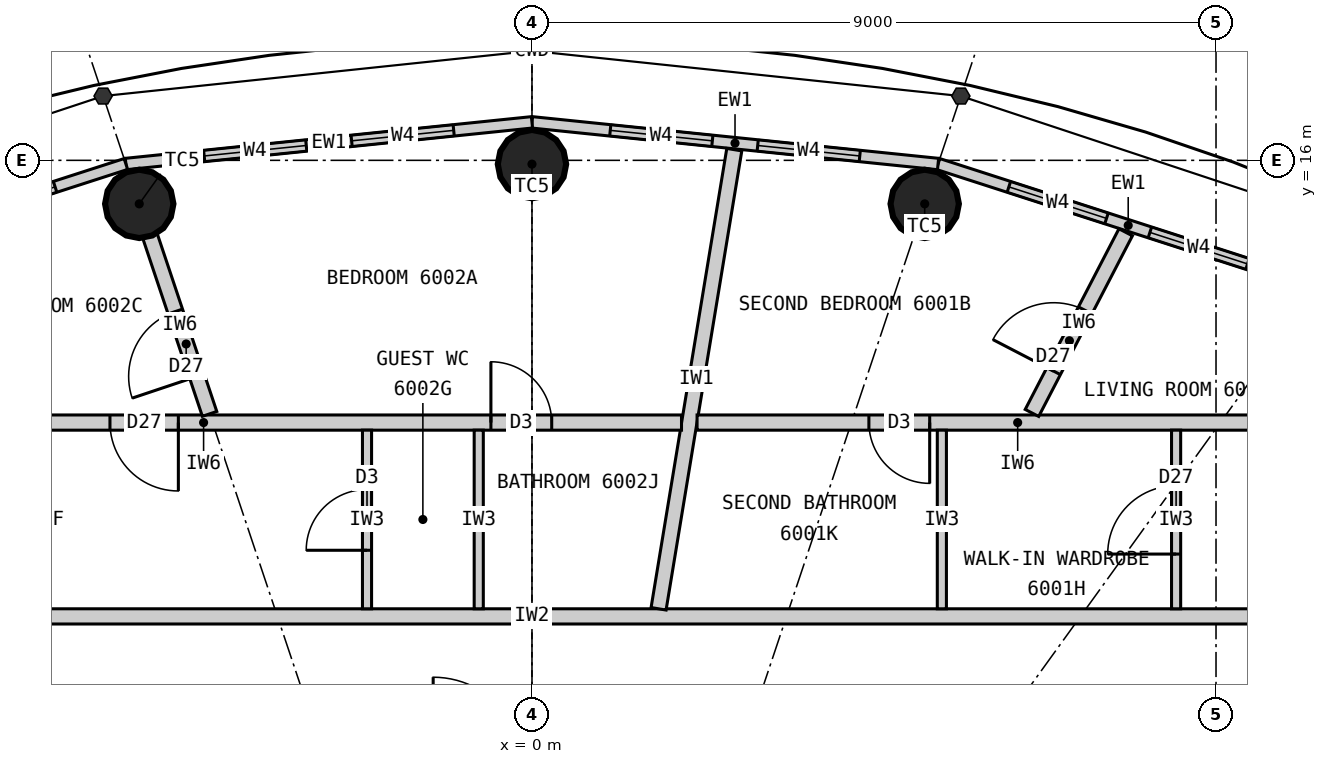
"""IFC4 building model, lengths in metres.
Left out: names, types, materials, properties, quantities, classifications, styles, units other than length and angle.
Written with IfcOpenShell. Run it as: python <this file> out.ifc"""

import sys

from ifc_helpers import new_model, si_unit, direction, frame, frame_2d, origin, origin_2d, place, context, subcontext, project, spatial, rectangle, circle, extrude, element, fill, save


model = new_model("IFC4")
c1 = context("Model", 3, precision=1e-05, world=origin(), true_north=direction((0.0, 1.0)))
c2 = subcontext(c1, "Body", "Model", "MODEL_VIEW")
j1 = project(units=[si_unit("LENGTHUNIT", "METRE"), si_unit("PLANEANGLEUNIT", "RADIAN")], contexts=[c1])
p1 = place(None, origin())
s1 = spatial("IfcSite", under=j1, at=p1, CompositionType="ELEMENT")
p2 = place(p1, origin())
s2 = spatial("IfcBuilding", under=s1, at=p2, CompositionType="ELEMENT")
p3 = place(p2, frame((0.0, 0.0, 222.6)))
s3 = spatial("IfcBuildingStorey", under=s2, at=p3, CompositionType="ELEMENT", Elevation=222.6)
for number, where, z_axis, x_axis in (
    (1, (5.167, 15.427, 0.0), (0.0, 0.0, 1.0), (1.0, 0.0, 0.0)),
    (2, (0.0, 15.95, 0.0), (0.0, 0.0, 1.0), (1.0, 0.0, 0.0)),
    (3, (-5.167, 15.427, 0.0), (0.0, 0.0, 1.0), (1.0, 0.0, 0.0)),
):
    element("IfcColumn", number, at=place(p3, frame(where, z_axis=z_axis, x_axis=x_axis)), inside=s3, PredefinedType="COLUMN", context=c2, shape_type="SweptSolid", body=[
        extrude(circle(Radius=0.45, at=origin_2d()), origin(), (0.0, 0.0, 1.0), 3.3),
    ])
p4 = place(p3, frame((10.346, 14.336, 0.0), z_axis=(0.0, 0.0, 1.0), x_axis=(-0.951644702515, 0.307200846638, 0.0)))
e4 = element("IfcWall", 4, at=p4, inside=s3, PredefinedType="ELEMENTEDWALL", context=c2, shape_type="SweptSolid", body=[
    extrude(rectangle(XDim=5.258, YDim=0.15, at=frame_2d((2.629, 0.0))), origin(), (0.0, 0.0, 1.0), 3.12),
])
p5 = place(p4, frame((0.979, 0.0, 0.9)))
e5 = element("IfcOpeningElement", 5, at=p5, cuts=e4, PredefinedType="OPENING", context=c2, shape_type="SweptSolid", body=[
    extrude(rectangle(XDim=1.35, YDim=1.9, at=frame_2d((0.675, 0.95))), frame((0.0, 0.085, 0.0), z_axis=(0.0, -1.0, 0.0), x_axis=(1.0, 0.0, 0.0)), (0.0, 0.0, 1.0), 0.17),
])
p6 = place(p4, frame((2.929, 0.0, 0.9)))
e6 = element("IfcOpeningElement", 6, at=p6, cuts=e4, PredefinedType="OPENING", context=c2, shape_type="SweptSolid", body=[
    extrude(rectangle(XDim=1.35, YDim=1.9, at=frame_2d((0.675, 0.95))), frame((0.0, 0.085, 0.0), z_axis=(0.0, -1.0, 0.0), x_axis=(1.0, 0.0, 0.0)), (0.0, 0.0, 1.0), 0.17),
])
p7 = place(p3, frame((5.343, 15.952, 0.0), z_axis=(0.0, 0.0, 1.0), x_axis=(-0.994774574972, 0.102095763818, 0.0)))
e7 = element("IfcWall", 7, at=p7, inside=s3, PredefinedType="ELEMENTEDWALL", context=c2, shape_type="SweptSolid", body=[
    extrude(rectangle(XDim=5.371, YDim=0.15, at=frame_2d((2.686, 0.0))), origin(), (0.0, 0.0, 1.0), 3.12),
])
p8 = place(p7, frame((1.035, 0.0, 0.9)))
e8 = element("IfcOpeningElement", 8, at=p8, cuts=e7, PredefinedType="OPENING", context=c2, shape_type="SweptSolid", body=[
    extrude(rectangle(XDim=1.35, YDim=1.9, at=frame_2d((0.675, 0.95))), frame((0.0, 0.085, 0.0), z_axis=(0.0, -1.0, 0.0), x_axis=(1.0, 0.0, 0.0)), (0.0, 0.0, 1.0), 0.17),
])
p9 = place(p7, frame((2.985, 0.0, 0.9)))
e9 = element("IfcOpeningElement", 9, at=p9, cuts=e7, PredefinedType="OPENING", context=c2, shape_type="SweptSolid", body=[
    extrude(rectangle(XDim=1.35, YDim=1.9, at=frame_2d((0.675, 0.95))), frame((0.0, 0.085, 0.0), z_axis=(0.0, -1.0, 0.0), x_axis=(1.0, 0.0, 0.0)), (0.0, 0.0, 1.0), 0.17),
])
p10 = place(p3, frame((0.0, 16.5, 0.0), z_axis=(0.0, 0.0, 1.0), x_axis=(-0.994774574972, -0.102095763818, 0.0)))
e10 = element("IfcWall", 10, at=p10, inside=s3, PredefinedType="ELEMENTEDWALL", context=c2, shape_type="SweptSolid", body=[
    extrude(rectangle(XDim=5.371, YDim=0.15, at=frame_2d((2.686, 0.0))), origin(), (0.0, 0.0, 1.0), 3.12),
])
p11 = place(p10, frame((1.035, 0.0, 0.9)))
e11 = element("IfcOpeningElement", 11, at=p11, cuts=e10, PredefinedType="OPENING", context=c2, shape_type="SweptSolid", body=[
    extrude(rectangle(XDim=1.35, YDim=1.9, at=frame_2d((0.675, 0.95))), frame((0.0, 0.085, 0.0), z_axis=(0.0, -1.0, 0.0), x_axis=(1.0, 0.0, 0.0)), (0.0, 0.0, 1.0), 0.17),
])
p12 = place(p10, frame((2.985, 0.0, 0.9)))
e12 = element("IfcOpeningElement", 12, at=p12, cuts=e10, PredefinedType="OPENING", context=c2, shape_type="SweptSolid", body=[
    extrude(rectangle(XDim=1.35, YDim=1.9, at=frame_2d((0.675, 0.95))), frame((0.0, 0.085, 0.0), z_axis=(0.0, -1.0, 0.0), x_axis=(1.0, 0.0, 0.0)), (0.0, 0.0, 1.0), 0.17),
])
p13 = place(p3, frame((-5.343, 15.952, 0.0), z_axis=(0.0, 0.0, 1.0), x_axis=(-0.951644702515, -0.307200846638, 0.0)))
e13 = element("IfcWall", 13, at=p13, inside=s3, PredefinedType="ELEMENTEDWALL", context=c2, shape_type="SweptSolid", body=[
    extrude(rectangle(XDim=5.258, YDim=0.15, at=frame_2d((2.629, 0.0))), origin(), (0.0, 0.0, 1.0), 3.12),
])
p14 = place(p13, frame((0.979, 0.0, 0.9)))
e14 = element("IfcOpeningElement", 14, at=p14, cuts=e13, PredefinedType="OPENING", context=c2, shape_type="SweptSolid", body=[
    extrude(rectangle(XDim=1.35, YDim=1.9, at=frame_2d((0.675, 0.95))), frame((0.0, 0.085, 0.0), z_axis=(0.0, -1.0, 0.0), x_axis=(1.0, 0.0, 0.0)), (0.0, 0.0, 1.0), 0.17),
])
p15 = place(p13, frame((2.929, 0.0, 0.9)))
e15 = element("IfcOpeningElement", 15, at=p15, cuts=e13, PredefinedType="OPENING", context=c2, shape_type="SweptSolid", body=[
    extrude(rectangle(XDim=1.35, YDim=1.9, at=frame_2d((0.675, 0.95))), frame((0.0, 0.085, 0.0), z_axis=(0.0, -1.0, 0.0), x_axis=(1.0, 0.0, 0.0)), (0.0, 0.0, 1.0), 0.17),
])
p16 = place(p3, frame((-11.1, 10.0, 0.0), z_axis=(0.0, 0.0, 1.0), x_axis=(1.0, 0.0, 0.0)))
e16 = element("IfcWall", 16, at=p16, inside=s3, PredefinedType="PARTITIONING", context=c2, shape_type="SweptSolid", body=[
    extrude(rectangle(XDim=22.2, YDim=0.2, at=frame_2d((11.1, 0.0))), origin(), (0.0, 0.0, 1.0), 3.12),
])
p17 = place(p16, frame((20.9, 0.0, 0.0)))
e17 = element("IfcOpeningElement", 17, at=p17, cuts=e16, PredefinedType="OPENING", context=c2, shape_type="SweptSolid", body=[
    extrude(rectangle(XDim=1.0, YDim=2.2, at=frame_2d((0.5, 1.1))), frame((0.0, 0.11, 0.0), z_axis=(0.0, -1.0, 0.0), x_axis=(1.0, 0.0, 0.0)), (0.0, 0.0, 1.0), 0.22),
])
p18 = place(p16, frame((2.82, 0.0, 0.0)))
e18 = element("IfcOpeningElement", 18, at=p18, cuts=e16, PredefinedType="OPENING", context=c2, shape_type="SweptSolid", body=[
    extrude(rectangle(XDim=1.0, YDim=2.2, at=frame_2d((0.5, 1.1))), frame((0.0, 0.11, 0.0), z_axis=(0.0, -1.0, 0.0), x_axis=(1.0, 0.0, 0.0)), (0.0, 0.0, 1.0), 0.22),
])
p19 = place(p3, frame((1.666, 10.1, 0.0), z_axis=(0.0, 0.0, 1.0), x_axis=(0.162710847913, 0.986673796131, 0.0)))
e19 = element("IfcWall", 19, at=p19, inside=s3, PredefinedType="PARTITIONING", context=c2, shape_type="SweptSolid", body=[
    extrude(rectangle(XDim=6.122, YDim=0.2, at=frame_2d((3.061, 0.0))), origin(), (0.0, 0.0, 1.0), 3.12),
])
p20 = place(p3, frame((10.609, 12.55, 0.0), z_axis=(0.0, 0.0, 1.0), x_axis=(-1.0, 0.0, 0.0)))
e20 = element("IfcWall", 20, at=p20, inside=s3, PredefinedType="PARTITIONING", context=c2, shape_type="SweptSolid", body=[
    extrude(rectangle(XDim=8.437, YDim=0.2, at=frame_2d((4.218, 0.0))), origin(), (0.0, 0.0, 1.0), 3.12),
])
p21 = place(p20, frame((5.376, 0.0, 0.0)))
e21 = element("IfcOpeningElement", 21, at=p21, cuts=e20, PredefinedType="OPENING", context=c2, shape_type="SweptSolid", body=[
    extrude(rectangle(XDim=0.8, YDim=2.1, at=frame_2d((0.4, 1.05))), frame((0.0, 0.11, 0.0), z_axis=(0.0, -1.0, 0.0), x_axis=(1.0, 0.0, 0.0)), (0.0, 0.0, 1.0), 0.22),
])
p22 = place(p3, frame((6.578, 12.677, 0.0), z_axis=(0.0, 0.0, 1.0), x_axis=(0.460620531465, 0.887597164255, 0.0)))
e22 = element("IfcWall", 22, at=p22, inside=s3, PredefinedType="PARTITIONING", context=c2, shape_type="SweptSolid", body=[
    extrude(rectangle(XDim=2.678, YDim=0.2, at=frame_2d((1.339, 0.0))), origin(), (0.0, 0.0, 1.0), 3.12),
])
p23 = place(p22, frame((0.62, 0.0, 0.0)))
e23 = element("IfcOpeningElement", 23, at=p23, cuts=e22, PredefinedType="OPENING", context=c2, shape_type="SweptSolid", body=[
    extrude(rectangle(XDim=0.9, YDim=2.1, at=frame_2d((0.45, 1.05))), frame((0.0, 0.11, 0.0), z_axis=(0.0, -1.0, 0.0), x_axis=(1.0, 0.0, 0.0)), (0.0, 0.0, 1.0), 0.22),
])
p24 = place(p3, frame((8.475, 10.1, 0.0), z_axis=(0.0, 0.0, 1.0), x_axis=(0.0, 1.0, 0.0)))
e24 = element("IfcWall", 24, at=p24, inside=s3, PredefinedType="PARTITIONING", context=c2, shape_type="SweptSolid", body=[
    extrude(rectangle(XDim=2.35, YDim=0.12, at=frame_2d((1.175, 0.0))), origin(), (0.0, 0.0, 1.0), 3.12),
])
p25 = place(p24, frame((0.72, 0.0, 0.0)))
e25 = element("IfcOpeningElement", 25, at=p25, cuts=e24, PredefinedType="OPENING", context=c2, shape_type="SweptSolid", body=[
    extrude(rectangle(XDim=0.9, YDim=2.1, at=frame_2d((0.45, 1.05))), frame((0.0, 0.07, 0.0), z_axis=(0.0, -1.0, 0.0), x_axis=(1.0, 0.0, 0.0)), (0.0, 0.0, 1.0), 0.14),
])
p26 = place(p3, frame((5.393, 10.1, 0.0), z_axis=(0.0, 0.0, 1.0), x_axis=(0.0, 1.0, 0.0)))
e26 = element("IfcWall", 26, at=p26, inside=s3, PredefinedType="PARTITIONING", context=c2, shape_type="SweptSolid", body=[
    extrude(rectangle(XDim=2.35, YDim=0.12, at=frame_2d((1.175, 0.0))), origin(), (0.0, 0.0, 1.0), 3.12),
])
p27 = place(p3, frame((1.968, 12.55, 0.0), z_axis=(0.0, 0.0, 1.0), x_axis=(-1.0, 0.0, 0.0)))
e27 = element("IfcWall", 27, at=p27, inside=s3, PredefinedType="PARTITIONING", context=c2, shape_type="SweptSolid", body=[
    extrude(rectangle(XDim=12.576, YDim=0.2, at=frame_2d((6.288, 0.0))), origin(), (0.0, 0.0, 1.0), 3.12),
])
p28 = place(p27, frame((1.708, 0.0, 0.0)))
e28 = element("IfcOpeningElement", 28, at=p28, cuts=e27, PredefinedType="OPENING", context=c2, shape_type="SweptSolid", body=[
    extrude(rectangle(XDim=0.8, YDim=2.1, at=frame_2d((0.4, 1.05))), frame((0.0, 0.11, 0.0), z_axis=(0.0, -1.0, 0.0), x_axis=(1.0, 0.0, 0.0)), (0.0, 0.0, 1.0), 0.22),
])
p29 = place(p27, frame((6.62, 0.0, 0.0)))
e29 = element("IfcOpeningElement", 29, at=p29, cuts=e27, PredefinedType="OPENING", context=c2, shape_type="SweptSolid", body=[
    extrude(rectangle(XDim=0.9, YDim=2.1, at=frame_2d((0.45, 1.05))), frame((0.0, 0.11, 0.0), z_axis=(0.0, -1.0, 0.0), x_axis=(1.0, 0.0, 0.0)), (0.0, 0.0, 1.0), 0.22),
])
p30 = place(p3, frame((-4.242, 12.664, 0.0), z_axis=(0.0, 0.0, 1.0), x_axis=(-0.317594928911, 0.948226481981, 0.0)))
e30 = element("IfcWall", 30, at=p30, inside=s3, PredefinedType="PARTITIONING", context=c2, shape_type="SweptSolid", body=[
    extrude(rectangle(XDim=2.464, YDim=0.2, at=frame_2d((1.232, 0.0))), origin(), (0.0, 0.0, 1.0), 2.42),
])
p31 = place(p30, frame((0.52, 0.0, 0.0)))
e31 = element("IfcOpeningElement", 31, at=p31, cuts=e30, PredefinedType="OPENING", context=c2, shape_type="SweptSolid", body=[
    extrude(rectangle(XDim=0.9, YDim=2.1, at=frame_2d((0.45, 1.05))), frame((0.0, 0.11, 0.0), z_axis=(0.0, -1.0, 0.0), x_axis=(1.0, 0.0, 0.0)), (0.0, 0.0, 1.0), 0.22),
])
p32 = place(p3, frame((-0.7, 10.1, 0.0), z_axis=(0.0, 0.0, 1.0), x_axis=(0.0, 1.0, 0.0)))
e32 = element("IfcWall", 32, at=p32, inside=s3, PredefinedType="PARTITIONING", context=c2, shape_type="SweptSolid", body=[
    extrude(rectangle(XDim=2.35, YDim=0.12, at=frame_2d((1.175, 0.0))), origin(), (0.0, 0.0, 1.0), 3.12),
])
p33 = place(p3, frame((-2.17, 10.1, 0.0), z_axis=(0.0, 0.0, 1.0), x_axis=(0.0, 1.0, 0.0)))
e33 = element("IfcWall", 33, at=p33, inside=s3, PredefinedType="PARTITIONING", context=c2, shape_type="SweptSolid", body=[
    extrude(rectangle(XDim=2.35, YDim=0.12, at=frame_2d((1.175, 0.0))), origin(), (0.0, 0.0, 1.0), 3.12),
])
p34 = place(p33, frame((0.77, 0.0, 0.0)))
e34 = element("IfcOpeningElement", 34, at=p34, cuts=e33, PredefinedType="OPENING", context=c2, shape_type="SweptSolid", body=[
    extrude(rectangle(XDim=0.8, YDim=2.1, at=frame_2d((0.4, 1.05))), frame((0.0, 0.07, 0.0), z_axis=(0.0, -1.0, 0.0), x_axis=(1.0, 0.0, 0.0)), (0.0, 0.0, 1.0), 0.14),
])
p35 = place(p5, origin())
e35 = element("IfcWindow", 35, at=p35, inside=s3, PartitioningType="SINGLE_PANEL", PredefinedType="WINDOW", context=c2, shape_type="SweptSolid", body=[
    extrude(rectangle(XDim=1.35, YDim=1.9, at=frame_2d((0.675, 0.95))), frame((0.0, 0.03, 0.0), z_axis=(0.0, -1.0, 0.0), x_axis=(1.0, 0.0, 0.0)), (0.0, 0.0, 1.0), 0.06),
])
fill(e5, e35)
p36 = place(p6, origin())
e36 = element("IfcWindow", 36, at=p36, inside=s3, PartitioningType="SINGLE_PANEL", PredefinedType="WINDOW", context=c2, shape_type="SweptSolid", body=[
    extrude(rectangle(XDim=1.35, YDim=1.9, at=frame_2d((0.675, 0.95))), frame((0.0, 0.03, 0.0), z_axis=(0.0, -1.0, 0.0), x_axis=(1.0, 0.0, 0.0)), (0.0, 0.0, 1.0), 0.06),
])
fill(e6, e36)
p37 = place(p8, origin())
e37 = element("IfcWindow", 37, at=p37, inside=s3, PartitioningType="SINGLE_PANEL", PredefinedType="WINDOW", context=c2, shape_type="SweptSolid", body=[
    extrude(rectangle(XDim=1.35, YDim=1.9, at=frame_2d((0.675, 0.95))), frame((0.0, 0.03, 0.0), z_axis=(0.0, -1.0, 0.0), x_axis=(1.0, 0.0, 0.0)), (0.0, 0.0, 1.0), 0.06),
])
fill(e8, e37)
p38 = place(p9, origin())
e38 = element("IfcWindow", 38, at=p38, inside=s3, PartitioningType="SINGLE_PANEL", PredefinedType="WINDOW", context=c2, shape_type="SweptSolid", body=[
    extrude(rectangle(XDim=1.35, YDim=1.9, at=frame_2d((0.675, 0.95))), frame((0.0, 0.03, 0.0), z_axis=(0.0, -1.0, 0.0), x_axis=(1.0, 0.0, 0.0)), (0.0, 0.0, 1.0), 0.06),
])
fill(e9, e38)
p39 = place(p11, origin())
e39 = element("IfcWindow", 39, at=p39, inside=s3, PartitioningType="SINGLE_PANEL", PredefinedType="WINDOW", context=c2, shape_type="SweptSolid", body=[
    extrude(rectangle(XDim=1.35, YDim=1.9, at=frame_2d((0.675, 0.95))), frame((0.0, 0.03, 0.0), z_axis=(0.0, -1.0, 0.0), x_axis=(1.0, 0.0, 0.0)), (0.0, 0.0, 1.0), 0.06),
])
fill(e11, e39)
p40 = place(p12, origin())
e40 = element("IfcWindow", 40, at=p40, inside=s3, PartitioningType="SINGLE_PANEL", PredefinedType="WINDOW", context=c2, shape_type="SweptSolid", body=[
    extrude(rectangle(XDim=1.35, YDim=1.9, at=frame_2d((0.675, 0.95))), frame((0.0, 0.03, 0.0), z_axis=(0.0, -1.0, 0.0), x_axis=(1.0, 0.0, 0.0)), (0.0, 0.0, 1.0), 0.06),
])
fill(e12, e40)
p41 = place(p14, origin())
e41 = element("IfcWindow", 41, at=p41, inside=s3, PartitioningType="SINGLE_PANEL", PredefinedType="WINDOW", context=c2, shape_type="SweptSolid", body=[
    extrude(rectangle(XDim=1.35, YDim=1.9, at=frame_2d((0.675, 0.95))), frame((0.0, 0.03, 0.0), z_axis=(0.0, -1.0, 0.0), x_axis=(1.0, 0.0, 0.0)), (0.0, 0.0, 1.0), 0.06),
])
fill(e14, e41)
p42 = place(p25, origin())
e42 = element("IfcDoor", 42, at=p42, inside=s3, OperationType="SINGLE_SWING_LEFT", PredefinedType="DOOR", context=c2, shape_type="SweptSolid", body=[
    extrude(rectangle(XDim=0.9, YDim=2.1, at=frame_2d((0.45, 1.05))), frame((0.0, 0.025, 0.0), z_axis=(0.0, -1.0, 0.0), x_axis=(1.0, 0.0, 0.0)), (0.0, 0.0, 1.0), 0.05),
])
fill(e25, e42)
p43 = place(p21, origin())
e43 = element("IfcDoor", 43, at=p43, inside=s3, OperationType="SINGLE_SWING_LEFT", PredefinedType="DOOR", context=c2, shape_type="SweptSolid", body=[
    extrude(rectangle(XDim=0.8, YDim=2.1, at=frame_2d((0.4, 1.05))), frame((0.0, 0.025, 0.0), z_axis=(0.0, -1.0, 0.0), x_axis=(1.0, 0.0, 0.0)), (0.0, 0.0, 1.0), 0.05),
])
fill(e21, e43)
p44 = place(p23, origin())
e44 = element("IfcDoor", 44, at=p44, inside=s3, OperationType="SINGLE_SWING_LEFT", PredefinedType="DOOR", context=c2, shape_type="SweptSolid", body=[
    extrude(rectangle(XDim=0.9, YDim=2.1, at=frame_2d((0.45, 1.05))), frame((0.0, 0.025, 0.0), z_axis=(0.0, -1.0, 0.0), x_axis=(1.0, 0.0, 0.0)), (0.0, 0.0, 1.0), 0.05),
])
fill(e23, e44)
p45 = place(p28, origin())
e45 = element("IfcDoor", 45, at=p45, inside=s3, OperationType="SINGLE_SWING_RIGHT", PredefinedType="DOOR", context=c2, shape_type="SweptSolid", body=[
    extrude(rectangle(XDim=0.8, YDim=2.1, at=frame_2d((0.4, 1.05))), frame((0.0, 0.025, 0.0), z_axis=(0.0, -1.0, 0.0), x_axis=(1.0, 0.0, 0.0)), (0.0, 0.0, 1.0), 0.05),
])
fill(e28, e45)
p46 = place(p34, origin())
e46 = element("IfcDoor", 46, at=p46, inside=s3, OperationType="SINGLE_SWING_LEFT", PredefinedType="DOOR", context=c2, shape_type="SweptSolid", body=[
    extrude(rectangle(XDim=0.8, YDim=2.1, at=frame_2d((0.4, 1.05))), frame((0.0, 0.025, 0.0), z_axis=(0.0, -1.0, 0.0), x_axis=(1.0, 0.0, 0.0)), (0.0, 0.0, 1.0), 0.05),
])
fill(e34, e46)
p47 = place(p29, origin())
e47 = element("IfcDoor", 47, at=p47, inside=s3, OperationType="SINGLE_SWING_LEFT", PredefinedType="DOOR", context=c2, shape_type="SweptSolid", body=[
    extrude(rectangle(XDim=0.9, YDim=2.1, at=frame_2d((0.45, 1.05))), frame((0.0, 0.025, 0.0), z_axis=(0.0, -1.0, 0.0), x_axis=(1.0, 0.0, 0.0)), (0.0, 0.0, 1.0), 0.05),
])
fill(e29, e47)
p48 = place(p31, origin())
e48 = element("IfcDoor", 48, at=p48, inside=s3, OperationType="SINGLE_SWING_LEFT", PredefinedType="DOOR", context=c2, shape_type="SweptSolid", body=[
    extrude(rectangle(XDim=0.9, YDim=2.1, at=frame_2d((0.45, 1.05))), frame((0.0, 0.025, 0.0), z_axis=(0.0, -1.0, 0.0), x_axis=(1.0, 0.0, 0.0)), (0.0, 0.0, 1.0), 0.05),
])
fill(e31, e48)
save(model, sys.argv[1])
